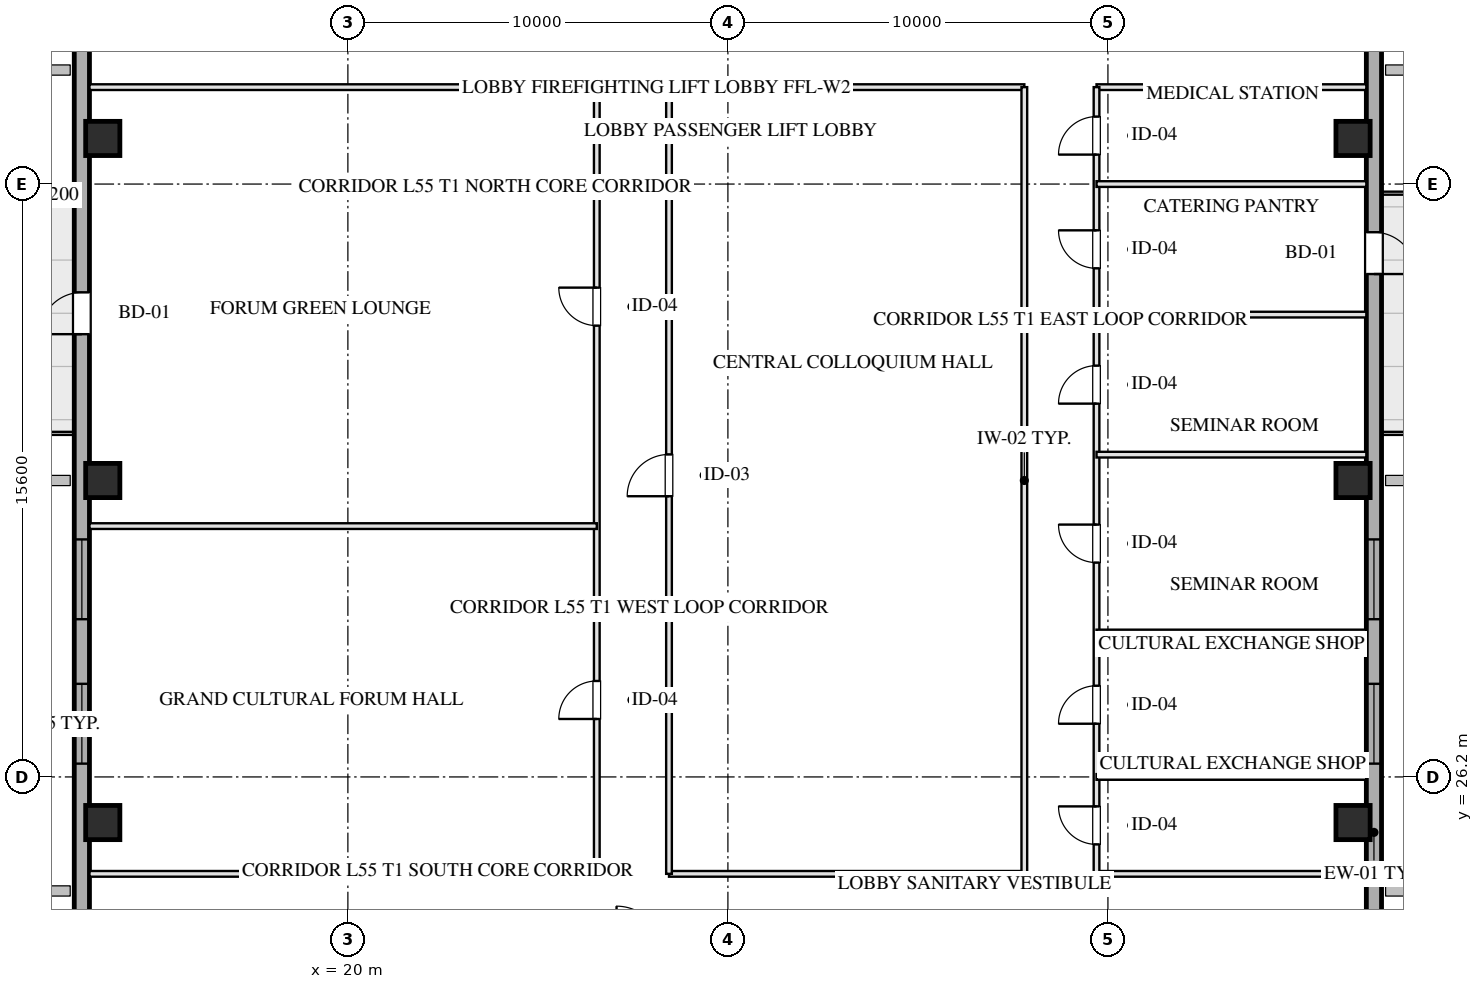
"""IFC4 building model, lengths in metres.
Left out: names, types, materials, properties, quantities, classifications, styles, units other than length and angle.
Written with IfcOpenShell. Run it as: python <this file> out.ifc"""

import sys

from ifc_helpers import new_model, si_unit, direction, frame, frame_2d, origin, origin_2d, place, context, subcontext, project, spatial, rectangle, hollow_rectangle, extrude, element, fill, save


model = new_model("IFC4")
c1 = context("Model", 3, precision=1e-05, world=origin(), true_north=direction((0.0, 1.0)))
c2 = subcontext(c1, "Body", "Model", "MODEL_VIEW")
j1 = project(units=[si_unit("LENGTHUNIT", "METRE"), si_unit("PLANEANGLEUNIT", "RADIAN")], contexts=[c1])
p1 = place(None, origin())
s1 = spatial("IfcSite", under=j1, at=p1, CompositionType="ELEMENT")
p2 = place(p1, origin())
s2 = spatial("IfcBuilding", under=s1, at=p2, CompositionType="ELEMENT")
p3 = place(p2, frame((0.0, 0.0, 205.85)))
s3 = spatial("IfcBuildingStorey", under=s2, at=p3, CompositionType="ELEMENT", Elevation=205.85)
for number, where, z_axis, x_axis in (
    (1, (13.55, 25.0, 0.0), (0.0, 0.0, 1.0), (1.0, 0.0, 0.0)),
    (2, (13.55, 34.0, 0.0), (0.0, 0.0, 1.0), (1.0, 0.0, 0.0)),
    (3, (13.55, 43.0, 0.0), (0.0, 0.0, 1.0), (1.0, 0.0, 0.0)),
    (4, (46.45, 25.0, 0.0), (0.0, 0.0, 1.0), (1.0, 0.0, 0.0)),
    (5, (46.45, 34.0, 0.0), (0.0, 0.0, 1.0), (1.0, 0.0, 0.0)),
    (6, (46.45, 43.0, 0.0), (0.0, 0.0, 1.0), (1.0, 0.0, 0.0)),
):
    element("IfcColumn", number, at=place(p3, frame(where, z_axis=z_axis, x_axis=x_axis)), inside=s3, PredefinedType="COLUMN", context=c2, shape_type="SweptSolid", body=[
        extrude(hollow_rectangle(XDim=0.9, YDim=0.9, WallThickness=0.032, at=origin_2d()), origin(), (0.0, 0.0, 1.0), 3.451),
    ])
p4 = place(p3, frame((13.0, 10.8, 0.0), z_axis=(0.0, 0.0, 1.0), x_axis=(0.0, 1.0, 0.0)))
e7 = element("IfcWall", 7, at=p4, inside=s3, PredefinedType="SOLIDWALL", context=c2, shape_type="SweptSolid", body=[
    extrude(rectangle(XDim=46.4, YDim=0.4, at=frame_2d((23.2, 0.0))), origin(), (0.0, 0.0, 1.0), 2.61),
])
p5 = place(p4, frame((15.75, 0.0, 0.75)))
e8 = element("IfcOpeningElement", 8, at=p5, cuts=e7, PredefinedType="OPENING", context=c2, shape_type="SweptSolid", body=[
    extrude(rectangle(XDim=2.1, YDim=1.46, at=frame_2d((1.05, 0.73))), frame((0.0, 0.21, 0.0), z_axis=(0.0, -1.0, 0.0), x_axis=(1.0, 0.0, 0.0)), (0.0, 0.0, 1.0), 0.42),
])
p6 = place(p4, frame((19.55, 0.0, 0.75)))
e9 = element("IfcOpeningElement", 9, at=p6, cuts=e7, PredefinedType="OPENING", context=c2, shape_type="SweptSolid", body=[
    extrude(rectangle(XDim=2.1, YDim=1.46, at=frame_2d((1.05, 0.73))), frame((0.0, 0.21, 0.0), z_axis=(0.0, -1.0, 0.0), x_axis=(1.0, 0.0, 0.0)), (0.0, 0.0, 1.0), 0.42),
])
p7 = place(p4, frame((27.05, 0.0, 0.0)))
e10 = element("IfcOpeningElement", 10, at=p7, cuts=e7, PredefinedType="OPENING", context=c2, shape_type="SweptSolid", body=[
    extrude(rectangle(XDim=1.1, YDim=2.15, at=frame_2d((0.55, 1.075))), frame((0.0, 0.21, 0.0), z_axis=(0.0, -1.0, 0.0), x_axis=(1.0, 0.0, 0.0)), (0.0, 0.0, 1.0), 0.42),
])
p8 = place(p3, frame((47.0, 57.2, 0.0), z_axis=(0.0, 0.0, 1.0), x_axis=(0.0, -1.0, 0.0)))
e11 = element("IfcWall", 11, at=p8, inside=s3, PredefinedType="SOLIDWALL", context=c2, shape_type="SweptSolid", body=[
    extrude(rectangle(XDim=46.4, YDim=0.4, at=frame_2d((23.2, 0.0))), origin(), (0.0, 0.0, 1.0), 2.61),
])
p9 = place(p8, frame((28.55, 0.0, 0.75)))
e12 = element("IfcOpeningElement", 12, at=p9, cuts=e11, PredefinedType="OPENING", context=c2, shape_type="SweptSolid", body=[
    extrude(rectangle(XDim=2.1, YDim=1.46, at=frame_2d((1.05, 0.73))), frame((0.0, 0.21, 0.0), z_axis=(0.0, -1.0, 0.0), x_axis=(1.0, 0.0, 0.0)), (0.0, 0.0, 1.0), 0.42),
])
p10 = place(p8, frame((24.75, 0.0, 0.75)))
e13 = element("IfcOpeningElement", 13, at=p10, cuts=e11, PredefinedType="OPENING", context=c2, shape_type="SweptSolid", body=[
    extrude(rectangle(XDim=2.1, YDim=1.46, at=frame_2d((1.05, 0.73))), frame((0.0, 0.21, 0.0), z_axis=(0.0, -1.0, 0.0), x_axis=(1.0, 0.0, 0.0)), (0.0, 0.0, 1.0), 0.42),
])
p11 = place(p8, frame((16.667, 0.0, 0.0)))
e14 = element("IfcOpeningElement", 14, at=p11, cuts=e11, PredefinedType="OPENING", context=c2, shape_type="SweptSolid", body=[
    extrude(rectangle(XDim=1.1, YDim=2.15, at=frame_2d((0.55, 1.075))), frame((0.0, 0.21, 0.0), z_axis=(0.0, -1.0, 0.0), x_axis=(1.0, 0.0, 0.0)), (0.0, 0.0, 1.0), 0.42),
])
p12 = place(p3, frame((13.2, 23.65, 0.0), z_axis=(0.0, 0.0, 1.0), x_axis=(1.0, 0.0, 0.0)))
e15 = element("IfcWall", 15, at=p12, inside=s3, PredefinedType="PARTITIONING", context=c2, shape_type="SweptSolid", body=[
    extrude(rectangle(XDim=13.35, YDim=0.15, at=frame_2d((6.675, 0.0))), origin(), (0.0, 0.0, 1.0), 3.175),
])
p13 = place(p3, frame((28.45, 23.65, 0.0), z_axis=(0.0, 0.0, 1.0), x_axis=(1.0, 0.0, 0.0)))
e16 = element("IfcWall", 16, at=p13, inside=s3, PredefinedType="PARTITIONING", context=c2, shape_type="SweptSolid", body=[
    extrude(rectangle(XDim=9.35, YDim=0.15, at=frame_2d((4.675, 0.0))), origin(), (0.0, 0.0, 1.0), 3.175),
])
p14 = place(p3, frame((39.7, 23.65, 0.0), z_axis=(0.0, 0.0, 1.0), x_axis=(1.0, 0.0, 0.0)))
e17 = element("IfcWall", 17, at=p14, inside=s3, PredefinedType="PARTITIONING", context=c2, shape_type="SweptSolid", body=[
    extrude(rectangle(XDim=7.1, YDim=0.15, at=frame_2d((3.55, 0.0))), origin(), (0.0, 0.0, 1.0), 3.175),
])
p15 = place(p3, frame((13.2, 44.35, 0.0), z_axis=(0.0, 0.0, 1.0), x_axis=(1.0, 0.0, 0.0)))
e18 = element("IfcWall", 18, at=p15, inside=s3, PredefinedType="PARTITIONING", context=c2, shape_type="SweptSolid", body=[
    extrude(rectangle(XDim=13.35, YDim=0.15, at=frame_2d((6.675, 0.0))), origin(), (0.0, 0.0, 1.0), 3.175),
])
p16 = place(p3, frame((28.45, 44.35, 0.0), z_axis=(0.0, 0.0, 1.0), x_axis=(1.0, 0.0, 0.0)))
e19 = element("IfcWall", 19, at=p16, inside=s3, PredefinedType="PARTITIONING", context=c2, shape_type="SweptSolid", body=[
    extrude(rectangle(XDim=9.35, YDim=0.15, at=frame_2d((4.675, 0.0))), origin(), (0.0, 0.0, 1.0), 3.175),
])
p17 = place(p3, frame((39.7, 44.35, 0.0), z_axis=(0.0, 0.0, 1.0), x_axis=(1.0, 0.0, 0.0)))
e20 = element("IfcWall", 20, at=p17, inside=s3, PredefinedType="PARTITIONING", context=c2, shape_type="SweptSolid", body=[
    extrude(rectangle(XDim=7.1, YDim=0.15, at=frame_2d((3.55, 0.0))), origin(), (0.0, 0.0, 1.0), 3.175),
])
p18 = place(p3, frame((26.55, 23.65, 0.0), z_axis=(0.0, 0.0, 1.0), x_axis=(0.0, 1.0, 0.0)))
e21 = element("IfcWall", 21, at=p18, inside=s3, PredefinedType="PARTITIONING", context=c2, shape_type="SweptSolid", body=[
    extrude(rectangle(XDim=20.7, YDim=0.15, at=frame_2d((10.35, 0.0))), origin(), (0.0, 0.0, 1.0), 3.175),
])
p19 = place(p18, frame((4.075, 0.0, 0.0)))
e22 = element("IfcOpeningElement", 22, at=p19, cuts=e21, PredefinedType="OPENING", context=c2, shape_type="SweptSolid", body=[
    extrude(rectangle(XDim=1.0, YDim=2.05, at=frame_2d((0.5, 1.025))), frame((0.0, 0.085, 0.0), z_axis=(0.0, -1.0, 0.0), x_axis=(1.0, 0.0, 0.0)), (0.0, 0.0, 1.0), 0.17),
])
p20 = place(p18, frame((14.425, 0.0, 0.0)))
e23 = element("IfcOpeningElement", 23, at=p20, cuts=e21, PredefinedType="OPENING", context=c2, shape_type="SweptSolid", body=[
    extrude(rectangle(XDim=1.0, YDim=2.05, at=frame_2d((0.5, 1.025))), frame((0.0, 0.085, 0.0), z_axis=(0.0, -1.0, 0.0), x_axis=(1.0, 0.0, 0.0)), (0.0, 0.0, 1.0), 0.17),
])
p21 = place(p3, frame((28.45, 23.65, 0.0), z_axis=(0.0, 0.0, 1.0), x_axis=(0.0, 1.0, 0.0)))
e24 = element("IfcWall", 24, at=p21, inside=s3, PredefinedType="PARTITIONING", context=c2, shape_type="SweptSolid", body=[
    extrude(rectangle(XDim=20.7, YDim=0.15, at=frame_2d((10.35, 0.0))), origin(), (0.0, 0.0, 1.0), 3.175),
])
p22 = place(p21, frame((9.936, 0.0, 0.0)))
e25 = element("IfcOpeningElement", 25, at=p22, cuts=e24, PredefinedType="OPENING", context=c2, shape_type="SweptSolid", body=[
    extrude(rectangle(XDim=1.1, YDim=2.05, at=frame_2d((0.55, 1.025))), frame((0.0, 0.085, 0.0), z_axis=(0.0, -1.0, 0.0), x_axis=(1.0, 0.0, 0.0)), (0.0, 0.0, 1.0), 0.17),
])
p23 = place(p3, frame((37.8, 23.65, 0.0), z_axis=(0.0, 0.0, 1.0), x_axis=(0.0, 1.0, 0.0)))
e26 = element("IfcWall", 26, at=p23, inside=s3, PredefinedType="PARTITIONING", context=c2, shape_type="SweptSolid", body=[
    extrude(rectangle(XDim=20.7, YDim=0.15, at=frame_2d((10.35, 0.0))), origin(), (0.0, 0.0, 1.0), 3.175),
])
p24 = place(p3, frame((39.7, 23.65, 0.0), z_axis=(0.0, 0.0, 1.0), x_axis=(0.0, 1.0, 0.0)))
e27 = element("IfcWall", 27, at=p24, inside=s3, PredefinedType="PARTITIONING", context=c2, shape_type="SweptSolid", body=[
    extrude(rectangle(XDim=20.7, YDim=0.15, at=frame_2d((10.35, 0.0))), origin(), (0.0, 0.0, 1.0), 3.175),
])
p25 = place(p24, frame((0.775, 0.0, 0.0)))
e28 = element("IfcOpeningElement", 28, at=p25, cuts=e27, PredefinedType="OPENING", context=c2, shape_type="SweptSolid", body=[
    extrude(rectangle(XDim=1.0, YDim=2.05, at=frame_2d((0.5, 1.025))), frame((0.0, 0.085, 0.0), z_axis=(0.0, -1.0, 0.0), x_axis=(1.0, 0.0, 0.0)), (0.0, 0.0, 1.0), 0.17),
])
p26 = place(p24, frame((3.95, 0.0, 0.0)))
e29 = element("IfcOpeningElement", 29, at=p26, cuts=e27, PredefinedType="OPENING", context=c2, shape_type="SweptSolid", body=[
    extrude(rectangle(XDim=1.0, YDim=2.05, at=frame_2d((0.5, 1.025))), frame((0.0, 0.085, 0.0), z_axis=(0.0, -1.0, 0.0), x_axis=(1.0, 0.0, 0.0)), (0.0, 0.0, 1.0), 0.17),
])
p27 = place(p24, frame((8.19, 0.0, 0.0)))
e30 = element("IfcOpeningElement", 30, at=p27, cuts=e27, PredefinedType="OPENING", context=c2, shape_type="SweptSolid", body=[
    extrude(rectangle(XDim=1.0, YDim=2.05, at=frame_2d((0.5, 1.025))), frame((0.0, 0.085, 0.0), z_axis=(0.0, -1.0, 0.0), x_axis=(1.0, 0.0, 0.0)), (0.0, 0.0, 1.0), 0.17),
])
p28 = place(p24, frame((12.373, 0.0, 0.0)))
e31 = element("IfcOpeningElement", 31, at=p28, cuts=e27, PredefinedType="OPENING", context=c2, shape_type="SweptSolid", body=[
    extrude(rectangle(XDim=1.0, YDim=2.05, at=frame_2d((0.5, 1.025))), frame((0.0, 0.085, 0.0), z_axis=(0.0, -1.0, 0.0), x_axis=(1.0, 0.0, 0.0)), (0.0, 0.0, 1.0), 0.17),
])
p29 = place(p24, frame((15.933, 0.0, 0.0)))
e32 = element("IfcOpeningElement", 32, at=p29, cuts=e27, PredefinedType="OPENING", context=c2, shape_type="SweptSolid", body=[
    extrude(rectangle(XDim=1.0, YDim=2.05, at=frame_2d((0.5, 1.025))), frame((0.0, 0.085, 0.0), z_axis=(0.0, -1.0, 0.0), x_axis=(1.0, 0.0, 0.0)), (0.0, 0.0, 1.0), 0.17),
])
p30 = place(p24, frame((18.925, 0.0, 0.0)))
e33 = element("IfcOpeningElement", 33, at=p30, cuts=e27, PredefinedType="OPENING", context=c2, shape_type="SweptSolid", body=[
    extrude(rectangle(XDim=1.0, YDim=2.05, at=frame_2d((0.5, 1.025))), frame((0.0, 0.085, 0.0), z_axis=(0.0, -1.0, 0.0), x_axis=(1.0, 0.0, 0.0)), (0.0, 0.0, 1.0), 0.17),
])
p31 = place(p3, frame((13.2, 32.8, 0.0), z_axis=(0.0, 0.0, 1.0), x_axis=(1.0, 0.0, 0.0)))
e34 = element("IfcWall", 34, at=p31, inside=s3, PredefinedType="PARTITIONING", context=c2, shape_type="SweptSolid", body=[
    extrude(rectangle(XDim=13.35, YDim=0.15, at=frame_2d((6.675, 0.0))), origin(), (0.0, 0.0, 1.0), 3.175),
])
for number, where, z_axis, x_axis in (
    (35, (39.7, 26.2, 0.0), (0.0, 0.0, 1.0), (1.0, 0.0, 0.0)),
    (36, (39.7, 30.0, 0.0), (0.0, 0.0, 1.0), (1.0, 0.0, 0.0)),
    (37, (39.7, 34.68, 0.0), (0.0, 0.0, 1.0), (1.0, 0.0, 0.0)),
    (38, (39.7, 38.365, 0.0), (0.0, 0.0, 1.0), (1.0, 0.0, 0.0)),
    (39, (39.7, 41.8, 0.0), (0.0, 0.0, 1.0), (1.0, 0.0, 0.0)),
):
    element("IfcWall", number, at=place(p3, frame(where, z_axis=z_axis, x_axis=x_axis)), inside=s3, PredefinedType="PARTITIONING", context=c2, shape_type="SweptSolid", body=[
        extrude(rectangle(XDim=7.1, YDim=0.15, at=frame_2d((3.55, 0.0))), origin(), (0.0, 0.0, 1.0), 3.175),
    ])
p32 = place(p5, origin())
e40 = element("IfcWindow", 40, at=p32, inside=s3, PartitioningType="TRIPLE_PANEL_VERTICAL", PredefinedType="WINDOW", context=c2, shape_type="SweptSolid", body=[
    extrude(rectangle(XDim=2.1, YDim=1.46, at=frame_2d((1.05, 0.73))), frame((0.0, 0.03, 0.0), z_axis=(0.0, -1.0, 0.0), x_axis=(1.0, 0.0, 0.0)), (0.0, 0.0, 1.0), 0.06),
])
fill(e8, e40)
p33 = place(p6, origin())
e41 = element("IfcWindow", 41, at=p33, inside=s3, PartitioningType="TRIPLE_PANEL_VERTICAL", PredefinedType="WINDOW", context=c2, shape_type="SweptSolid", body=[
    extrude(rectangle(XDim=2.1, YDim=1.46, at=frame_2d((1.05, 0.73))), frame((0.0, 0.03, 0.0), z_axis=(0.0, -1.0, 0.0), x_axis=(1.0, 0.0, 0.0)), (0.0, 0.0, 1.0), 0.06),
])
fill(e9, e41)
p34 = place(p9, origin())
e42 = element("IfcWindow", 42, at=p34, inside=s3, PartitioningType="TRIPLE_PANEL_VERTICAL", PredefinedType="WINDOW", context=c2, shape_type="SweptSolid", body=[
    extrude(rectangle(XDim=2.1, YDim=1.46, at=frame_2d((1.05, 0.73))), frame((0.0, 0.03, 0.0), z_axis=(0.0, -1.0, 0.0), x_axis=(1.0, 0.0, 0.0)), (0.0, 0.0, 1.0), 0.06),
])
fill(e12, e42)
p35 = place(p10, origin())
e43 = element("IfcWindow", 43, at=p35, inside=s3, PartitioningType="TRIPLE_PANEL_VERTICAL", PredefinedType="WINDOW", context=c2, shape_type="SweptSolid", body=[
    extrude(rectangle(XDim=2.1, YDim=1.46, at=frame_2d((1.05, 0.73))), frame((0.0, 0.03, 0.0), z_axis=(0.0, -1.0, 0.0), x_axis=(1.0, 0.0, 0.0)), (0.0, 0.0, 1.0), 0.06),
])
fill(e13, e43)
p36 = place(p7, origin())
e44 = element("IfcDoor", 44, at=p36, inside=s3, OperationType="SINGLE_SWING_LEFT", PredefinedType="DOOR", context=c2, shape_type="SweptSolid", body=[
    extrude(rectangle(XDim=1.1, YDim=2.15, at=frame_2d((0.55, 1.075))), frame((0.0, 0.025, 0.0), z_axis=(0.0, -1.0, 0.0), x_axis=(1.0, 0.0, 0.0)), (0.0, 0.0, 1.0), 0.05),
])
fill(e10, e44)
p37 = place(p11, origin())
e45 = element("IfcDoor", 45, at=p37, inside=s3, OperationType="SINGLE_SWING_RIGHT", PredefinedType="DOOR", context=c2, shape_type="SweptSolid", body=[
    extrude(rectangle(XDim=1.1, YDim=2.15, at=frame_2d((0.55, 1.075))), frame((0.0, 0.025, 0.0), z_axis=(0.0, -1.0, 0.0), x_axis=(1.0, 0.0, 0.0)), (0.0, 0.0, 1.0), 0.05),
])
fill(e14, e45)
p38 = place(p19, origin())
e46 = element("IfcDoor", 46, at=p38, inside=s3, OperationType="SINGLE_SWING_LEFT", PredefinedType="DOOR", context=c2, shape_type="SweptSolid", body=[
    extrude(rectangle(XDim=1.0, YDim=2.05, at=frame_2d((0.5, 1.025))), frame((0.0, 0.025, 0.0), z_axis=(0.0, -1.0, 0.0), x_axis=(1.0, 0.0, 0.0)), (0.0, 0.0, 1.0), 0.05),
])
fill(e22, e46)
p39 = place(p20, origin())
e47 = element("IfcDoor", 47, at=p39, inside=s3, OperationType="SINGLE_SWING_RIGHT", PredefinedType="DOOR", context=c2, shape_type="SweptSolid", body=[
    extrude(rectangle(XDim=1.0, YDim=2.05, at=frame_2d((0.5, 1.025))), frame((0.0, 0.025, 0.0), z_axis=(0.0, -1.0, 0.0), x_axis=(1.0, 0.0, 0.0)), (0.0, 0.0, 1.0), 0.05),
])
fill(e23, e47)
p40 = place(p22, origin())
e48 = element("IfcDoor", 48, at=p40, inside=s3, OperationType="SINGLE_SWING_LEFT", PredefinedType="DOOR", context=c2, shape_type="SweptSolid", body=[
    extrude(rectangle(XDim=1.1, YDim=2.05, at=frame_2d((0.55, 1.025))), frame((0.0, 0.025, 0.0), z_axis=(0.0, -1.0, 0.0), x_axis=(1.0, 0.0, 0.0)), (0.0, 0.0, 1.0), 0.05),
])
fill(e25, e48)
p41 = place(p25, origin())
e49 = element("IfcDoor", 49, at=p41, inside=s3, OperationType="SINGLE_SWING_RIGHT", PredefinedType="DOOR", context=c2, shape_type="SweptSolid", body=[
    extrude(rectangle(XDim=1.0, YDim=2.05, at=frame_2d((0.5, 1.025))), frame((0.0, 0.025, 0.0), z_axis=(0.0, -1.0, 0.0), x_axis=(1.0, 0.0, 0.0)), (0.0, 0.0, 1.0), 0.05),
])
fill(e28, e49)
p42 = place(p26, origin())
e50 = element("IfcDoor", 50, at=p42, inside=s3, OperationType="SINGLE_SWING_LEFT", PredefinedType="DOOR", context=c2, shape_type="SweptSolid", body=[
    extrude(rectangle(XDim=1.0, YDim=2.05, at=frame_2d((0.5, 1.025))), frame((0.0, 0.025, 0.0), z_axis=(0.0, -1.0, 0.0), x_axis=(1.0, 0.0, 0.0)), (0.0, 0.0, 1.0), 0.05),
])
fill(e29, e50)
p43 = place(p27, origin())
e51 = element("IfcDoor", 51, at=p43, inside=s3, OperationType="SINGLE_SWING_RIGHT", PredefinedType="DOOR", context=c2, shape_type="SweptSolid", body=[
    extrude(rectangle(XDim=1.0, YDim=2.05, at=frame_2d((0.5, 1.025))), frame((0.0, 0.025, 0.0), z_axis=(0.0, -1.0, 0.0), x_axis=(1.0, 0.0, 0.0)), (0.0, 0.0, 1.0), 0.05),
])
fill(e30, e51)
p44 = place(p28, origin())
e52 = element("IfcDoor", 52, at=p44, inside=s3, OperationType="SINGLE_SWING_LEFT", PredefinedType="DOOR", context=c2, shape_type="SweptSolid", body=[
    extrude(rectangle(XDim=1.0, YDim=2.05, at=frame_2d((0.5, 1.025))), frame((0.0, 0.025, 0.0), z_axis=(0.0, -1.0, 0.0), x_axis=(1.0, 0.0, 0.0)), (0.0, 0.0, 1.0), 0.05),
])
fill(e31, e52)
p45 = place(p29, origin())
e53 = element("IfcDoor", 53, at=p45, inside=s3, OperationType="SINGLE_SWING_RIGHT", PredefinedType="DOOR", context=c2, shape_type="SweptSolid", body=[
    extrude(rectangle(XDim=1.0, YDim=2.05, at=frame_2d((0.5, 1.025))), frame((0.0, 0.025, 0.0), z_axis=(0.0, -1.0, 0.0), x_axis=(1.0, 0.0, 0.0)), (0.0, 0.0, 1.0), 0.05),
])
fill(e32, e53)
p46 = place(p30, origin())
e54 = element("IfcDoor", 54, at=p46, inside=s3, OperationType="SINGLE_SWING_LEFT", PredefinedType="DOOR", context=c2, shape_type="SweptSolid", body=[
    extrude(rectangle(XDim=1.0, YDim=2.05, at=frame_2d((0.5, 1.025))), frame((0.0, 0.025, 0.0), z_axis=(0.0, -1.0, 0.0), x_axis=(1.0, 0.0, 0.0)), (0.0, 0.0, 1.0), 0.05),
])
fill(e33, e54)
save(model, sys.argv[1])
